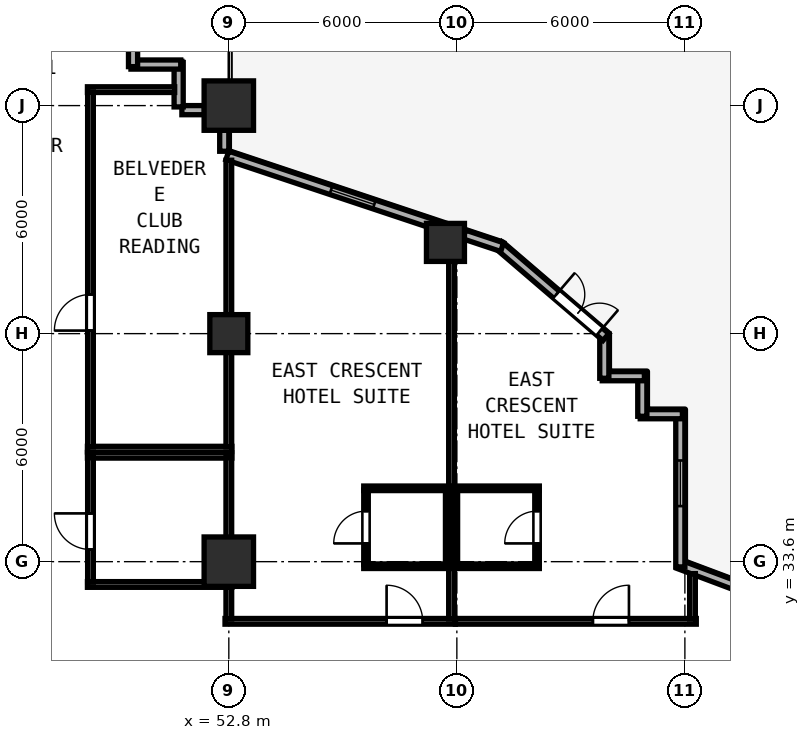
"""IFC4 building model, lengths in metres.
Left out: names, types, materials, properties, quantities, classifications, styles, units other than length and angle.
Written with IfcOpenShell. Run it as: python <this file> out.ifc"""

import sys

from ifc_helpers import new_model, si_unit, direction, frame, frame_2d, origin, origin_2d, place, context, subcontext, project, spatial, rectangle, hollow_rectangle, extrude, element, fill, save


model = new_model("IFC4")
c1 = context("Model", 3, precision=1e-05, world=origin(), true_north=direction((0.0, 1.0)))
c2 = subcontext(c1, "Body", "Model", "MODEL_VIEW")
j1 = project(units=[si_unit("LENGTHUNIT", "METRE"), si_unit("PLANEANGLEUNIT", "RADIAN")], contexts=[c1])
p1 = place(None, origin())
s1 = spatial("IfcSite", under=j1, at=p1, CompositionType="ELEMENT")
p2 = place(p1, origin())
s2 = spatial("IfcBuilding", under=s1, at=p2, CompositionType="ELEMENT")
p3 = place(p2, frame((0.0, 0.0, 24.0)))
s3 = spatial("IfcBuildingStorey", under=s2, at=p3, CompositionType="ELEMENT", Elevation=24.0)
for number, where, z_axis, x_axis in (
    (1, (52.8, 33.6, 0.0), (0.0, 0.0, 1.0), (1.0, 0.0, 0.0)),
    (2, (52.8, 45.6, 0.0), (0.0, 0.0, 1.0), (1.0, 0.0, 0.0)),
):
    element("IfcColumn", number, at=place(p3, frame(where, z_axis=z_axis, x_axis=x_axis)), inside=s3, PredefinedType="COLUMN", context=c2, shape_type="SweptSolid", body=[
        extrude(hollow_rectangle(XDim=1.3, YDim=1.3, WallThickness=0.048, at=origin_2d()), origin(), (0.0, 0.0, 1.0), 3.8),
    ])
for number, where, z_axis, x_axis in (
    (3, (52.8, 39.6, -0.26), (0.0, 0.0, 1.0), (1.0, 0.0, 0.0)),
    (4, (58.5, 42.0, -0.26), (0.0, 0.0, 1.0), (1.0, 0.0, 0.0)),
):
    element("IfcColumn", number, at=place(p3, frame(where, z_axis=z_axis, x_axis=x_axis)), inside=s3, PredefinedType="COLUMN", context=c2, shape_type="SweptSolid", body=[
        extrude(hollow_rectangle(XDim=1.0, YDim=1.0, WallThickness=0.038, at=origin_2d()), origin(), (0.0, 0.0, 1.0), 4.06),
    ])
p4 = place(p3, frame((71.183, 31.078, 0.0), z_axis=(0.0, 0.0, 1.0), x_axis=(-0.936332044214, 0.351115797106, 0.0)))
e5 = element("IfcWall", 5, at=p4, inside=s3, PredefinedType="SOLIDWALL", context=c2, shape_type="SweptSolid", body=[
    extrude(rectangle(XDim=7.0, YDim=0.24, at=frame_2d((3.5, 0.0))), origin(), (0.0, 0.0, 1.0), 3.6),
])
p5 = place(p4, frame((1.6, 0.0, 0.85)))
e6 = element("IfcOpeningElement", 6, at=p5, cuts=e5, PredefinedType="OPENING", context=c2, shape_type="SweptSolid", body=[
    extrude(rectangle(XDim=1.2, YDim=1.85, at=frame_2d((0.6, 0.925))), frame((0.0, 0.13, 0.0), z_axis=(0.0, -1.0, 0.0), x_axis=(1.0, 0.0, 0.0)), (0.0, 0.0, 1.0), 0.26),
])
p6 = place(p3, frame((64.68, 33.462, 0.0), z_axis=(0.0, 0.0, 1.0), x_axis=(0.0, 1.0, 0.0)))
e7 = element("IfcWall", 7, at=p6, inside=s3, PredefinedType="SOLIDWALL", context=c2, shape_type="SweptSolid", body=[
    extrude(rectangle(XDim=4.073, YDim=0.24, at=frame_2d((2.037, 0.0))), origin(), (0.0, 0.0, 1.0), 3.6),
])
p7 = place(p6, frame((1.6, 0.0, 0.85)))
e8 = element("IfcOpeningElement", 8, at=p7, cuts=e7, PredefinedType="OPENING", context=c2, shape_type="SweptSolid", body=[
    extrude(rectangle(XDim=1.2, YDim=1.85, at=frame_2d((0.6, 0.925))), frame((0.0, 0.13, 0.0), z_axis=(0.0, -1.0, 0.0), x_axis=(1.0, 0.0, 0.0)), (0.0, 0.0, 1.0), 0.26),
])
p8 = place(p3, frame((64.735, 37.48, 0.0), z_axis=(0.0, 0.0, 1.0), x_axis=(-1.0, 0.0, 0.0)))
e9 = element("IfcWall", 9, at=p8, inside=s3, PredefinedType="SOLIDWALL", context=c2, shape_type="SweptSolid", body=[
    extrude(rectangle(XDim=1.11, YDim=0.24, at=frame_2d((0.555, 0.0))), origin(), (0.0, 0.0, 1.0), 3.6),
])
p9 = place(p3, frame((63.68, 37.425, 0.0), z_axis=(0.0, 0.0, 1.0), x_axis=(0.0, 1.0, 0.0)))
e10 = element("IfcWall", 10, at=p9, inside=s3, PredefinedType="SOLIDWALL", context=c2, shape_type="SweptSolid", body=[
    extrude(rectangle(XDim=1.11, YDim=0.24, at=frame_2d((0.555, 0.0))), origin(), (0.0, 0.0, 1.0), 3.6),
])
p10 = place(p3, frame((63.735, 38.48, 0.0), z_axis=(0.0, 0.0, 1.0), x_axis=(-1.0, 0.0, 0.0)))
e11 = element("IfcWall", 11, at=p10, inside=s3, PredefinedType="SOLIDWALL", context=c2, shape_type="SweptSolid", body=[
    extrude(rectangle(XDim=1.11, YDim=0.24, at=frame_2d((0.555, 0.0))), origin(), (0.0, 0.0, 1.0), 3.6),
])
p11 = place(p3, frame((62.68, 38.425, 0.0), z_axis=(0.0, 0.0, 1.0), x_axis=(0.0, 1.0, 0.0)))
e12 = element("IfcWall", 12, at=p11, inside=s3, PredefinedType="SOLIDWALL", context=c2, shape_type="SweptSolid", body=[
    extrude(rectangle(XDim=1.175, YDim=0.24, at=frame_2d((0.587, 0.0))), origin(), (0.0, 0.0, 1.0), 3.6),
])
p12 = place(p3, frame((62.722, 39.509, 0.0), z_axis=(0.0, 0.0, 1.0), x_axis=(-0.759247334792, 0.650802185469, 0.0)))
e13 = element("IfcWall", 13, at=p12, inside=s3, PredefinedType="SOLIDWALL", context=c2, shape_type="SweptSolid", body=[
    extrude(rectangle(XDim=3.719, YDim=0.24, at=frame_2d((1.86, 0.0))), origin(), (0.0, 0.0, 1.0), 3.6),
])
p13 = place(p12, frame((1.72, 0.0, 0.0), z_axis=(0.0, 0.0, 1.0), x_axis=(-1.0, 0.0, 0.0)))
e14 = element("IfcOpeningElement", 14, at=p13, cuts=e13, PredefinedType="OPENING", context=c2, shape_type="SweptSolid", body=[
    extrude(rectangle(XDim=1.5, YDim=2.2, at=frame_2d((0.75, 1.1))), frame((0.0, 0.13, 0.0), z_axis=(0.0, -1.0, 0.0), x_axis=(1.0, 0.0, 0.0)), (0.0, 0.0, 1.0), 0.26),
])
p14 = place(p3, frame((59.992, 41.876, 0.0), z_axis=(0.0, 0.0, 1.0), x_axis=(-0.948706457285, 0.316158279832, 0.0)))
e15 = element("IfcWall", 15, at=p14, inside=s3, PredefinedType="SOLIDWALL", context=c2, shape_type="SweptSolid", body=[
    extrude(rectangle(XDim=1.054, YDim=0.24, at=frame_2d((0.527, 0.0))), origin(), (0.0, 0.0, 1.0), 3.6),
])
p15 = place(p3, frame((58.145, 42.492, 0.0), z_axis=(0.0, 0.0, 1.0), x_axis=(-0.948683298051, 0.316227766017, 0.0)))
e16 = element("IfcWall", 16, at=p15, inside=s3, PredefinedType="SOLIDWALL", context=c2, shape_type="SweptSolid", body=[
    extrude(rectangle(XDim=5.675, YDim=0.24, at=frame_2d((2.838, 0.0))), origin(), (0.0, 0.0, 1.0), 3.097),
])
p16 = place(p15, frame((1.6, 0.0, 0.85)))
e17 = element("IfcOpeningElement", 17, at=p16, cuts=e16, PredefinedType="OPENING", context=c2, shape_type="SweptSolid", body=[
    extrude(rectangle(XDim=1.2, YDim=1.85, at=frame_2d((0.6, 0.925))), frame((0.0, 0.13, 0.0), z_axis=(0.0, -1.0, 0.0), x_axis=(1.0, 0.0, 0.0)), (0.0, 0.0, 1.0), 0.26),
])
p17 = place(p3, frame((52.68, 44.398, 0.0), z_axis=(0.0, 0.0, 1.0), x_axis=(0.0, 1.0, 0.0)))
e18 = element("IfcWall", 18, at=p17, inside=s3, PredefinedType="SOLIDWALL", context=c2, shape_type="SweptSolid", body=[
    extrude(rectangle(XDim=0.56, YDim=0.24, at=frame_2d((0.28, 0.0))), origin(), (0.0, 0.0, 1.0), 3.097),
])
p18 = place(p3, frame((52.158, 45.48, 0.0), z_axis=(0.0, 0.0, 1.0), x_axis=(-1.0, 0.0, 0.0)))
e19 = element("IfcWall", 19, at=p18, inside=s3, PredefinedType="SOLIDWALL", context=c2, shape_type="SweptSolid", body=[
    extrude(rectangle(XDim=0.593, YDim=0.24, at=frame_2d((0.296, 0.0))), origin(), (0.0, 0.0, 1.0), 3.6),
])
p19 = place(p3, frame((51.48, 45.565, 0.0), z_axis=(0.0, 0.0, 1.0), x_axis=(0.0, 1.0, 0.0)))
e20 = element("IfcWall", 20, at=p19, inside=s3, PredefinedType="SOLIDWALL", context=c2, shape_type="SweptSolid", body=[
    extrude(rectangle(XDim=1.17, YDim=0.24, at=frame_2d((0.585, 0.0))), origin(), (0.0, 0.0, 1.0), 3.6),
])
p20 = place(p3, frame((51.535, 46.68, 0.0), z_axis=(0.0, 0.0, 1.0), x_axis=(-1.0, 0.0, 0.0)))
e21 = element("IfcWall", 21, at=p20, inside=s3, PredefinedType="SOLIDWALL", context=c2, shape_type="SweptSolid", body=[
    extrude(rectangle(XDim=1.31, YDim=0.24, at=frame_2d((0.655, 0.0))), origin(), (0.0, 0.0, 1.0), 3.6),
])
p21 = place(p3, frame((50.28, 46.625, 0.0), z_axis=(0.0, 0.0, 1.0), x_axis=(0.0, 1.0, 0.0)))
e22 = element("IfcWall", 22, at=p21, inside=s3, PredefinedType="SOLIDWALL", context=c2, shape_type="SweptSolid", body=[
    extrude(rectangle(XDim=1.37, YDim=0.24, at=frame_2d((0.685, 0.0))), origin(), (0.0, 0.0, 1.0), 3.6),
])
for number, where, z_axis, x_axis in (
    (23, (49.08, 36.4, 0.0), (0.0, 0.0, 1.0), (1.0, 0.0, 0.0)),
    (24, (49.08, 33.0, 0.0), (0.0, 0.0, 1.0), (1.0, 0.0, 0.0)),
):
    element("IfcWall", number, at=place(p3, frame(where, z_axis=z_axis, x_axis=x_axis)), inside=s3, PredefinedType="PARTITIONING", context=c2, shape_type="SweptSolid", body=[
        extrude(rectangle(XDim=3.8, YDim=0.15, at=frame_2d((1.9, 0.0))), origin(), (0.0, 0.0, 1.0), 3.6),
    ])
p22 = place(p3, frame((49.16, 33.06, 0.0), z_axis=(0.0, 0.0, 1.0), x_axis=(0.0, 1.0, 0.0)))
e25 = element("IfcWall", 25, at=p22, inside=s3, PredefinedType="PARTITIONING", context=c2, shape_type="SweptSolid", body=[
    extrude(rectangle(XDim=3.28, YDim=0.15, at=frame_2d((1.64, 0.0))), origin(), (0.0, 0.0, 1.0), 3.6),
])
p23 = place(p22, frame((0.86, 0.0, 0.0)))
e26 = element("IfcOpeningElement", 26, at=p23, cuts=e25, PredefinedType="OPENING", context=c2, shape_type="SweptSolid", body=[
    extrude(rectangle(XDim=0.95, YDim=2.12, at=frame_2d((0.475, 1.06))), frame((0.0, 0.085, 0.0), z_axis=(0.0, -1.0, 0.0), x_axis=(1.0, 0.0, 0.0)), (0.0, 0.0, 1.0), 0.17),
])
p24 = place(p3, frame((52.8, 33.06, 0.0), z_axis=(0.0, 0.0, 1.0), x_axis=(0.0, 1.0, 0.0)))
e27 = element("IfcWall", 27, at=p24, inside=s3, PredefinedType="PARTITIONING", context=c2, shape_type="SweptSolid", body=[
    extrude(rectangle(XDim=3.28, YDim=0.15, at=frame_2d((1.64, 0.0))), origin(), (0.0, 0.0, 1.0), 3.097),
])
p25 = place(p3, frame((49.08, 46.02, 0.0), z_axis=(0.0, 0.0, 1.0), x_axis=(1.0, 0.0, 0.0)))
e28 = element("IfcWall", 28, at=p25, inside=s3, PredefinedType="PARTITIONING", context=c2, shape_type="SweptSolid", body=[
    extrude(rectangle(XDim=2.295, YDim=0.15, at=frame_2d((1.147, 0.0))), origin(), (0.0, 0.0, 1.0), 3.6),
])
p26 = place(p3, frame((49.08, 36.56, 0.0), z_axis=(0.0, 0.0, 1.0), x_axis=(1.0, 0.0, 0.0)))
e29 = element("IfcWall", 29, at=p26, inside=s3, PredefinedType="PARTITIONING", context=c2, shape_type="SweptSolid", body=[
    extrude(rectangle(XDim=3.8, YDim=0.15, at=frame_2d((1.9, 0.0))), origin(), (0.0, 0.0, 1.0), 3.6),
])
p27 = place(p3, frame((49.16, 36.62, 0.0), z_axis=(0.0, 0.0, 1.0), x_axis=(0.0, 1.0, 0.0)))
e30 = element("IfcWall", 30, at=p27, inside=s3, PredefinedType="PARTITIONING", context=c2, shape_type="SweptSolid", body=[
    extrude(rectangle(XDim=9.34, YDim=0.15, at=frame_2d((4.67, 0.0))), origin(), (0.0, 0.0, 1.0), 3.6),
])
p28 = place(p27, frame((3.06, 0.0, 0.0)))
e31 = element("IfcOpeningElement", 31, at=p28, cuts=e30, PredefinedType="OPENING", context=c2, shape_type="SweptSolid", body=[
    extrude(rectangle(XDim=0.95, YDim=2.12, at=frame_2d((0.475, 1.06))), frame((0.0, 0.085, 0.0), z_axis=(0.0, -1.0, 0.0), x_axis=(1.0, 0.0, 0.0)), (0.0, 0.0, 1.0), 0.17),
])
p29 = place(p3, frame((52.8, 36.62, 0.0), z_axis=(0.0, 0.0, 1.0), x_axis=(0.0, 1.0, 0.0)))
e32 = element("IfcWall", 32, at=p29, inside=s3, PredefinedType="PARTITIONING", context=c2, shape_type="SweptSolid", body=[
    extrude(rectangle(XDim=7.543, YDim=0.15, at=frame_2d((3.771, 0.0))), origin(), (0.0, 0.0, 1.0), 3.097),
])
p30 = place(p3, frame((52.7, 32.03, 0.0), z_axis=(0.0, 0.0, 1.0), x_axis=(1.0, 0.0, 0.0)))
e33 = element("IfcWall", 33, at=p30, inside=s3, PredefinedType="PARTITIONING", context=c2, shape_type="SweptSolid", body=[
    extrude(rectangle(XDim=6.06, YDim=0.15, at=frame_2d((3.03, 0.0))), origin(), (0.0, 0.0, 1.0), 3.6),
])
p31 = place(p30, frame((4.251, 0.0, 0.0)))
e34 = element("IfcOpeningElement", 34, at=p31, cuts=e33, PredefinedType="OPENING", context=c2, shape_type="SweptSolid", body=[
    extrude(rectangle(XDim=0.95, YDim=2.18, at=frame_2d((0.475, 1.09))), frame((0.0, 0.085, 0.0), z_axis=(0.0, -1.0, 0.0), x_axis=(1.0, 0.0, 0.0)), (0.0, 0.0, 1.0), 0.17),
])
p32 = place(p3, frame((52.8, 32.09, 0.0), z_axis=(0.0, 0.0, 1.0), x_axis=(0.0, 1.0, 0.0)))
e35 = element("IfcWall", 35, at=p32, inside=s3, PredefinedType="PARTITIONING", context=c2, shape_type="SweptSolid", body=[
    extrude(rectangle(XDim=0.85, YDim=0.15, at=frame_2d((0.425, 0.0))), origin(), (0.0, 0.0, 1.0), 3.097),
])
p33 = place(p3, frame((58.66, 32.09, 0.0), z_axis=(0.0, 0.0, 1.0), x_axis=(0.0, 1.0, 0.0)))
e36 = element("IfcWall", 36, at=p33, inside=s3, PredefinedType="PARTITIONING", context=c2, shape_type="SweptSolid", body=[
    extrude(rectangle(XDim=10.133, YDim=0.15, at=frame_2d((5.066, 0.0))), origin(), (0.0, 0.0, 1.0), 3.6),
])
for number, where, z_axis, x_axis in (
    (37, (56.35, 35.53, 0.0), (0.0, 0.0, 1.0), (1.0, 0.0, 0.0)),
    (38, (56.35, 33.48, 0.0), (0.0, 0.0, 1.0), (1.0, 0.0, 0.0)),
):
    element("IfcWall", number, at=place(p3, frame(where, z_axis=z_axis, x_axis=x_axis)), inside=s3, PredefinedType="PARTITIONING", context=c2, shape_type="SweptSolid", body=[
        extrude(rectangle(XDim=2.25, YDim=0.12, at=frame_2d((1.125, 0.0))), origin(), (0.0, 0.0, 1.0), 3.6),
    ])
p34 = place(p3, frame((56.41, 33.525, 0.0), z_axis=(0.0, 0.0, 1.0), x_axis=(0.0, 1.0, 0.0)))
e39 = element("IfcWall", 39, at=p34, inside=s3, PredefinedType="PARTITIONING", context=c2, shape_type="SweptSolid", body=[
    extrude(rectangle(XDim=1.96, YDim=0.12, at=frame_2d((0.98, 0.0))), origin(), (0.0, 0.0, 1.0), 3.6),
])
p35 = place(p34, frame((1.405, 0.0, 0.0), z_axis=(0.0, 0.0, 1.0), x_axis=(-1.0, 0.0, 0.0)))
e40 = element("IfcOpeningElement", 40, at=p35, cuts=e39, PredefinedType="OPENING", context=c2, shape_type="SweptSolid", body=[
    extrude(rectangle(XDim=0.85, YDim=2.1, at=frame_2d((0.425, 1.05))), frame((0.0, 0.07, 0.0), z_axis=(0.0, -1.0, 0.0), x_axis=(1.0, 0.0, 0.0)), (0.0, 0.0, 1.0), 0.14),
])
p36 = place(p3, frame((58.56, 33.525, 0.0), z_axis=(0.0, 0.0, 1.0), x_axis=(0.0, 1.0, 0.0)))
e41 = element("IfcWall", 41, at=p36, inside=s3, PredefinedType="PARTITIONING", context=c2, shape_type="SweptSolid", body=[
    extrude(rectangle(XDim=1.96, YDim=0.12, at=frame_2d((0.98, 0.0))), origin(), (0.0, 0.0, 1.0), 3.6),
])
p37 = place(p3, frame((58.762, 32.03, 0.0), z_axis=(0.0, 0.0, 1.0), x_axis=(1.0, 0.0, 0.0)))
e42 = element("IfcWall", 42, at=p37, inside=s3, PredefinedType="PARTITIONING", context=c2, shape_type="SweptSolid", body=[
    extrude(rectangle(XDim=6.338, YDim=0.15, at=frame_2d((3.169, 0.0))), origin(), (0.0, 0.0, 1.0), 3.6),
])
p38 = place(p37, frame((3.616, 0.0, 0.0)))
e43 = element("IfcOpeningElement", 43, at=p38, cuts=e42, PredefinedType="OPENING", context=c2, shape_type="SweptSolid", body=[
    extrude(rectangle(XDim=0.95, YDim=2.18, at=frame_2d((0.475, 1.09))), frame((0.0, 0.085, 0.0), z_axis=(0.0, -1.0, 0.0), x_axis=(1.0, 0.0, 0.0)), (0.0, 0.0, 1.0), 0.17),
])
p39 = place(p3, frame((65.0, 32.09, 0.0), z_axis=(0.0, 0.0, 1.0), x_axis=(0.0, 1.0, 0.0)))
e44 = element("IfcWall", 44, at=p39, inside=s3, PredefinedType="PARTITIONING", context=c2, shape_type="SweptSolid", body=[
    extrude(rectangle(XDim=1.195, YDim=0.15, at=frame_2d((0.597, 0.0))), origin(), (0.0, 0.0, 1.0), 3.6),
])
for number, where, z_axis, x_axis in (
    (45, (58.72, 35.53, 0.0), (0.0, 0.0, 1.0), (1.0, 0.0, 0.0)),
    (46, (58.72, 33.48, 0.0), (0.0, 0.0, 1.0), (1.0, 0.0, 0.0)),
):
    element("IfcWall", number, at=place(p3, frame(where, z_axis=z_axis, x_axis=x_axis)), inside=s3, PredefinedType="PARTITIONING", context=c2, shape_type="SweptSolid", body=[
        extrude(rectangle(XDim=2.25, YDim=0.12, at=frame_2d((1.125, 0.0))), origin(), (0.0, 0.0, 1.0), 3.6),
    ])
p40 = place(p3, frame((58.76, 33.525, 0.0), z_axis=(0.0, 0.0, 1.0), x_axis=(0.0, 1.0, 0.0)))
e47 = element("IfcWall", 47, at=p40, inside=s3, PredefinedType="PARTITIONING", context=c2, shape_type="SweptSolid", body=[
    extrude(rectangle(XDim=1.96, YDim=0.12, at=frame_2d((0.98, 0.0))), origin(), (0.0, 0.0, 1.0), 3.6),
])
p41 = place(p3, frame((60.91, 33.525, 0.0), z_axis=(0.0, 0.0, 1.0), x_axis=(0.0, 1.0, 0.0)))
e48 = element("IfcWall", 48, at=p41, inside=s3, PredefinedType="PARTITIONING", context=c2, shape_type="SweptSolid", body=[
    extrude(rectangle(XDim=1.96, YDim=0.12, at=frame_2d((0.98, 0.0))), origin(), (0.0, 0.0, 1.0), 3.6),
])
p42 = place(p41, frame((0.555, 0.0, 0.0)))
e49 = element("IfcOpeningElement", 49, at=p42, cuts=e48, PredefinedType="OPENING", context=c2, shape_type="SweptSolid", body=[
    extrude(rectangle(XDim=0.85, YDim=2.1, at=frame_2d((0.425, 1.05))), frame((0.0, 0.07, 0.0), z_axis=(0.0, -1.0, 0.0), x_axis=(1.0, 0.0, 0.0)), (0.0, 0.0, 1.0), 0.14),
])
p43 = place(p7, origin())
e50 = element("IfcWindow", 50, at=p43, inside=s3, PartitioningType="SINGLE_PANEL", PredefinedType="WINDOW", context=c2, shape_type="SweptSolid", body=[
    extrude(rectangle(XDim=1.2, YDim=1.85, at=frame_2d((0.6, 0.925))), frame((0.0, 0.03, 0.0), z_axis=(0.0, -1.0, 0.0), x_axis=(1.0, 0.0, 0.0)), (0.0, 0.0, 1.0), 0.06),
])
fill(e8, e50)
p44 = place(p16, origin())
e51 = element("IfcWindow", 51, at=p44, inside=s3, PartitioningType="SINGLE_PANEL", PredefinedType="WINDOW", context=c2, shape_type="SweptSolid", body=[
    extrude(rectangle(XDim=1.2, YDim=1.85, at=frame_2d((0.6, 0.925))), frame((0.0, 0.03, 0.0), z_axis=(0.0, -1.0, 0.0), x_axis=(1.0, 0.0, 0.0)), (0.0, 0.0, 1.0), 0.06),
])
fill(e17, e51)
p45 = place(p13, origin())
e52 = element("IfcDoor", 52, at=p45, inside=s3, OperationType="DOUBLE_DOOR_SINGLE_SWING", PredefinedType="DOOR", context=c2, shape_type="SweptSolid", body=[
    extrude(rectangle(XDim=1.5, YDim=2.2, at=frame_2d((0.75, 1.1))), frame((0.0, 0.025, 0.0), z_axis=(0.0, -1.0, 0.0), x_axis=(1.0, 0.0, 0.0)), (0.0, 0.0, 1.0), 0.05),
])
fill(e14, e52)
p46 = place(p23, origin())
e53 = element("IfcDoor", 53, at=p46, inside=s3, OperationType="SINGLE_SWING_RIGHT", PredefinedType="DOOR", context=c2, shape_type="SweptSolid", body=[
    extrude(rectangle(XDim=0.95, YDim=2.12, at=frame_2d((0.475, 1.06))), frame((0.0, 0.025, 0.0), z_axis=(0.0, -1.0, 0.0), x_axis=(1.0, 0.0, 0.0)), (0.0, 0.0, 1.0), 0.05),
])
fill(e26, e53)
p47 = place(p28, origin())
e54 = element("IfcDoor", 54, at=p47, inside=s3, OperationType="SINGLE_SWING_LEFT", PredefinedType="DOOR", context=c2, shape_type="SweptSolid", body=[
    extrude(rectangle(XDim=0.95, YDim=2.12, at=frame_2d((0.475, 1.06))), frame((0.0, 0.025, 0.0), z_axis=(0.0, -1.0, 0.0), x_axis=(1.0, 0.0, 0.0)), (0.0, 0.0, 1.0), 0.05),
])
fill(e31, e54)
p48 = place(p31, origin())
e55 = element("IfcDoor", 55, at=p48, inside=s3, OperationType="SINGLE_SWING_LEFT", PredefinedType="DOOR", context=c2, shape_type="SweptSolid", body=[
    extrude(rectangle(XDim=0.95, YDim=2.18, at=frame_2d((0.475, 1.09))), frame((0.0, 0.025, 0.0), z_axis=(0.0, -1.0, 0.0), x_axis=(1.0, 0.0, 0.0)), (0.0, 0.0, 1.0), 0.05),
])
fill(e34, e55)
p49 = place(p35, origin())
e56 = element("IfcDoor", 56, at=p49, inside=s3, OperationType="SINGLE_SWING_RIGHT", PredefinedType="DOOR", context=c2, shape_type="SweptSolid", body=[
    extrude(rectangle(XDim=0.85, YDim=2.1, at=frame_2d((0.425, 1.05))), frame((0.0, 0.025, 0.0), z_axis=(0.0, -1.0, 0.0), x_axis=(1.0, 0.0, 0.0)), (0.0, 0.0, 1.0), 0.05),
])
fill(e40, e56)
p50 = place(p38, origin())
e57 = element("IfcDoor", 57, at=p50, inside=s3, OperationType="SINGLE_SWING_RIGHT", PredefinedType="DOOR", context=c2, shape_type="SweptSolid", body=[
    extrude(rectangle(XDim=0.95, YDim=2.18, at=frame_2d((0.475, 1.09))), frame((0.0, 0.025, 0.0), z_axis=(0.0, -1.0, 0.0), x_axis=(1.0, 0.0, 0.0)), (0.0, 0.0, 1.0), 0.05),
])
fill(e43, e57)
p51 = place(p42, origin())
e58 = element("IfcDoor", 58, at=p51, inside=s3, OperationType="SINGLE_SWING_LEFT", PredefinedType="DOOR", context=c2, shape_type="SweptSolid", body=[
    extrude(rectangle(XDim=0.85, YDim=2.1, at=frame_2d((0.425, 1.05))), frame((0.0, 0.025, 0.0), z_axis=(0.0, -1.0, 0.0), x_axis=(1.0, 0.0, 0.0)), (0.0, 0.0, 1.0), 0.05),
])
fill(e49, e58)
save(model, sys.argv[1])
